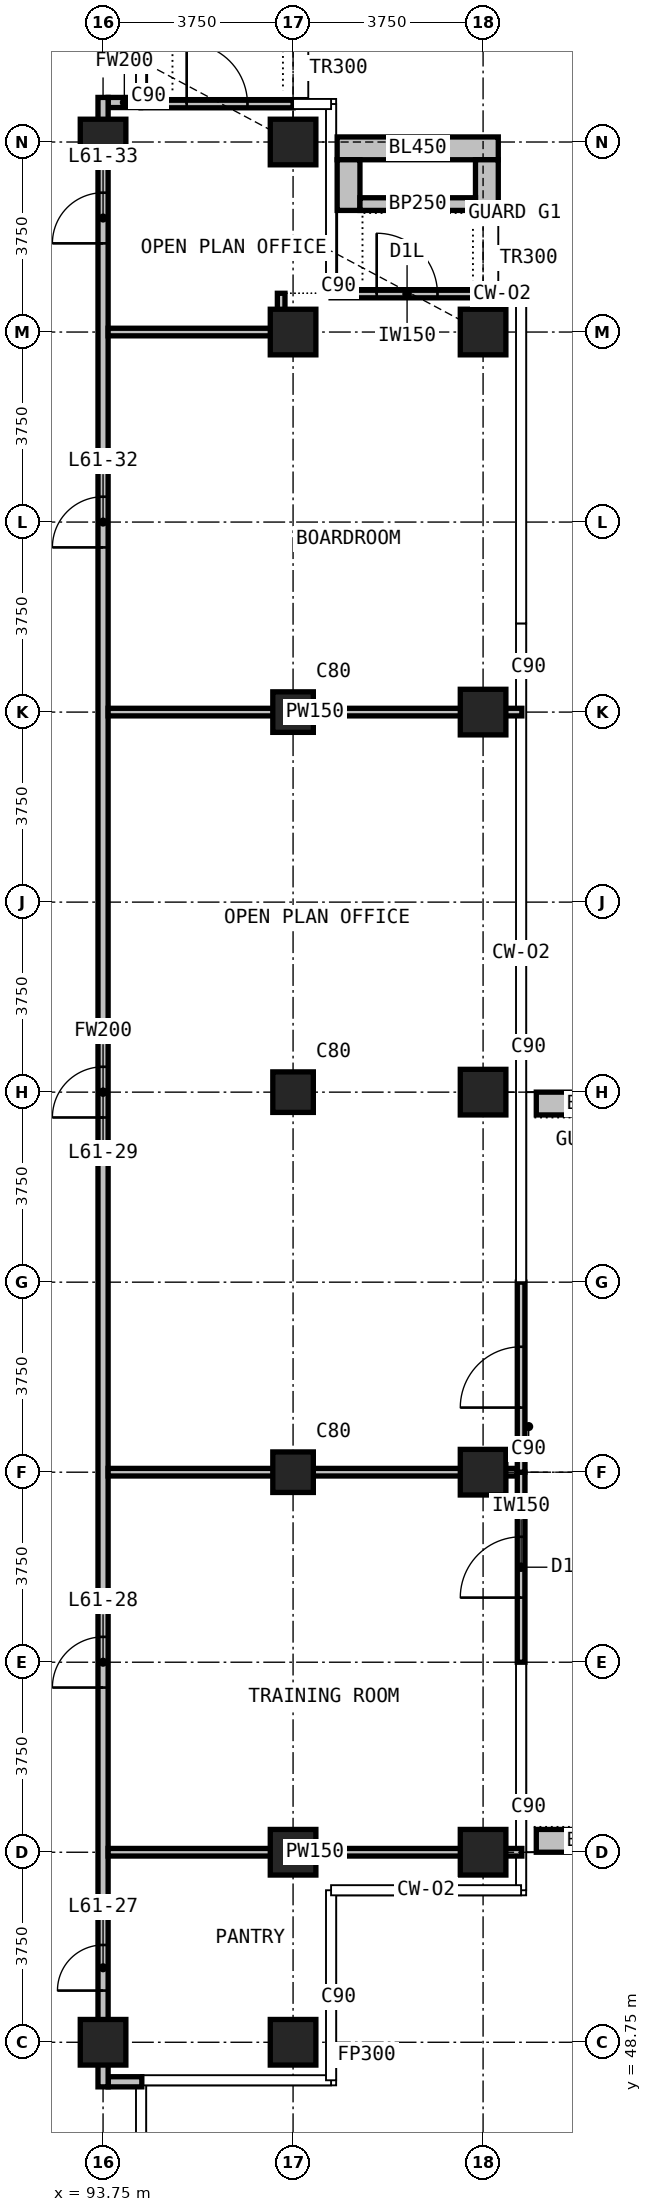
"""IFC4 building model, lengths in metres.
Left out: names, types, materials, properties, quantities, classifications, styles, units other than length and angle.
Written with IfcOpenShell. Run it as: python <this file> out.ifc"""

import sys

from ifc_helpers import new_model, si_unit, direction, frame, frame_2d, origin, origin_2d, place, context, subcontext, project, spatial, rectangle, extrude, element, fill, save


model = new_model("IFC4")
c1 = context("Model", 3, precision=1e-05, world=origin(), true_north=direction((0.0, 1.0)))
c2 = subcontext(c1, "Body", "Model", "MODEL_VIEW")
j1 = project(units=[si_unit("LENGTHUNIT", "METRE"), si_unit("PLANEANGLEUNIT", "RADIAN")], contexts=[c1])
p1 = place(None, origin())
s1 = spatial("IfcSite", under=j1, at=p1, CompositionType="ELEMENT")
p2 = place(p1, origin())
s2 = spatial("IfcBuilding", under=s1, at=p2, CompositionType="ELEMENT")
p3 = place(p2, frame((0.0, 0.0, 235.5)))
s3 = spatial("IfcBuildingStorey", under=s2, at=p3, CompositionType="ELEMENT", Elevation=235.5)
for number, where, z_axis, x_axis in (
    (1, (93.75, 48.75, 0.0), (0.0, 0.0, 1.0), (1.0, 0.0, 0.0)),
    (2, (93.75, 86.25, 0.0), (0.0, 0.0, 1.0), (1.0, 0.0, 0.0)),
    (3, (97.5, 48.75, 0.0), (0.0, 0.0, 1.0), (1.0, 0.0, 0.0)),
    (4, (97.5, 52.5, 0.0), (0.0, 0.0, 1.0), (1.0, 0.0, 0.0)),
):
    element("IfcColumn", number, at=place(p3, frame(where, z_axis=z_axis, x_axis=x_axis)), inside=s3, PredefinedType="COLUMN", context=c2, shape_type="SweptSolid", body=[
        extrude(rectangle(XDim=0.9, YDim=0.9, at=origin_2d()), origin(), (0.0, 0.0, 1.0), 3.6),
    ])
for number, where, z_axis, x_axis in (
    (5, (97.5, 60.0, 0.0), (0.0, 0.0, 1.0), (1.0, 0.0, 0.0)),
    (6, (97.5, 67.5, 0.0), (0.0, 0.0, 1.0), (1.0, 0.0, 0.0)),
    (7, (97.5, 75.0, 0.0), (0.0, 0.0, 1.0), (1.0, 0.0, 0.0)),
):
    element("IfcColumn", number, at=place(p3, frame(where, z_axis=z_axis, x_axis=x_axis)), inside=s3, PredefinedType="COLUMN", context=c2, shape_type="SweptSolid", body=[
        extrude(rectangle(XDim=0.8, YDim=0.8, at=origin_2d()), origin(), (0.0, 0.0, 1.0), 3.6),
    ])
for number, where, z_axis, x_axis in (
    (8, (97.5, 82.5, 0.0), (0.0, 0.0, 1.0), (1.0, 0.0, 0.0)),
    (9, (97.5, 86.25, 0.0), (0.0, 0.0, 1.0), (1.0, 0.0, 0.0)),
    (10, (101.25, 52.5, 0.0), (0.0, 0.0, 1.0), (1.0, 0.0, 0.0)),
    (11, (101.25, 60.0, 0.0), (0.0, 0.0, 1.0), (1.0, 0.0, 0.0)),
    (12, (101.25, 67.5, 0.0), (0.0, 0.0, 1.0), (1.0, 0.0, 0.0)),
    (13, (101.25, 75.0, 0.0), (0.0, 0.0, 1.0), (1.0, 0.0, 0.0)),
    (14, (101.25, 82.5, 0.0), (0.0, 0.0, 1.0), (1.0, 0.0, 0.0)),
):
    element("IfcColumn", number, at=place(p3, frame(where, z_axis=z_axis, x_axis=x_axis)), inside=s3, PredefinedType="COLUMN", context=c2, shape_type="SweptSolid", body=[
        extrude(rectangle(XDim=0.9, YDim=0.9, at=origin_2d()), origin(), (0.0, 0.0, 1.0), 3.6),
    ])
p4 = place(p3, frame((102.0, 56.25, 0.0), z_axis=(0.0, 0.0, 1.0), x_axis=(0.0, 1.0, 0.0)))
e15 = element("IfcWall", 15, at=p4, inside=s3, PredefinedType="SOLIDWALL", context=c2, shape_type="SweptSolid", body=[
    extrude(rectangle(XDim=3.75, YDim=0.15, at=frame_2d((1.875, 0.0))), origin(), (0.0, 0.0, 1.0), 3.3),
])
p5 = place(p4, frame((1.275, 0.0, 0.0)))
e16 = element("IfcOpeningElement", 16, at=p5, cuts=e15, PredefinedType="OPENING", context=c2, shape_type="SweptSolid", body=[
    extrude(rectangle(XDim=1.2, YDim=2.4, at=frame_2d((0.6, 1.2))), frame((0.0, 0.085, 0.0), z_axis=(0.0, -1.0, 0.0), x_axis=(1.0, 0.0, 0.0)), (0.0, 0.0, 1.0), 0.17),
])
p6 = place(p3, frame((102.0, 60.0, 0.0), z_axis=(0.0, 0.0, 1.0), x_axis=(0.0, 1.0, 0.0)))
e17 = element("IfcWall", 17, at=p6, inside=s3, PredefinedType="SOLIDWALL", context=c2, shape_type="SweptSolid", body=[
    extrude(rectangle(XDim=3.75, YDim=0.15, at=frame_2d((1.875, 0.0))), origin(), (0.0, 0.0, 1.0), 3.3),
])
p7 = place(p6, frame((1.275, 0.0, 0.0)))
e18 = element("IfcOpeningElement", 18, at=p7, cuts=e17, PredefinedType="OPENING", context=c2, shape_type="SweptSolid", body=[
    extrude(rectangle(XDim=1.2, YDim=2.4, at=frame_2d((0.6, 1.2))), frame((0.0, 0.085, 0.0), z_axis=(0.0, -1.0, 0.0), x_axis=(1.0, 0.0, 0.0)), (0.0, 0.0, 1.0), 0.17),
])
p8 = place(p3, frame((98.25, 83.25, 0.0), z_axis=(0.0, 0.0, 1.0), x_axis=(1.0, 0.0, 0.0)))
e19 = element("IfcWall", 19, at=p8, inside=s3, PredefinedType="SOLIDWALL", context=c2, shape_type="SweptSolid", body=[
    extrude(rectangle(XDim=3.0, YDim=0.15, at=frame_2d((1.5, 0.0))), origin(), (0.0, 0.0, 1.0), 3.3),
])
p9 = place(p8, frame((0.9, 0.0, 0.0)))
e20 = element("IfcOpeningElement", 20, at=p9, cuts=e19, PredefinedType="OPENING", context=c2, shape_type="SweptSolid", body=[
    extrude(rectangle(XDim=1.2, YDim=2.0, at=frame_2d((0.6, 1.0))), frame((0.0, 0.085, 0.0), z_axis=(0.0, -1.0, 0.0), x_axis=(1.0, 0.0, 0.0)), (0.0, 0.0, 1.0), 0.17),
])
p10 = place(p3, frame((94.5, 87.0, 0.0), z_axis=(0.0, 0.0, 1.0), x_axis=(1.0, 0.0, 0.0)))
e21 = element("IfcWall", 21, at=p10, inside=s3, PredefinedType="SOLIDWALL", context=c2, shape_type="SweptSolid", body=[
    extrude(rectangle(XDim=3.0, YDim=0.15, at=frame_2d((1.5, 0.0))), origin(), (0.0, 0.0, 1.0), 3.3),
])
p11 = place(p10, frame((0.9, 0.0, 0.0)))
e22 = element("IfcOpeningElement", 22, at=p11, cuts=e21, PredefinedType="OPENING", context=c2, shape_type="SweptSolid", body=[
    extrude(rectangle(XDim=1.2, YDim=2.0, at=frame_2d((0.6, 1.0))), frame((0.0, 0.085, 0.0), z_axis=(0.0, -1.0, 0.0), x_axis=(1.0, 0.0, 0.0)), (0.0, 0.0, 1.0), 0.17),
])
for number, where, z_axis, x_axis in (
    (23, (102.3, 52.725, 0.0), (0.0, 0.0, 1.0), (1.0, 0.0, 0.0)),
    (24, (102.3, 67.275, 0.0), (0.0, 0.0, 1.0), (1.0, 0.0, 0.0)),
):
    element("IfcWall", number, at=place(p3, frame(where, z_axis=z_axis, x_axis=x_axis)), inside=s3, PredefinedType="USERDEFINED", context=c2, shape_type="SweptSolid", body=[
        extrude(rectangle(XDim=2.35, YDim=0.45, at=frame_2d((1.175, 0.0))), origin(), (0.0, 0.0, 1.0), 1.1),
    ])
p12 = place(p3, frame((98.37, 86.125, 0.0), z_axis=(0.0, 0.0, 1.0), x_axis=(1.0, 0.0, 0.0)))
e25 = element("IfcWall", 25, at=p12, inside=s3, PredefinedType="USERDEFINED", context=c2, shape_type="SweptSolid", body=[
    extrude(rectangle(XDim=3.18, YDim=0.45, at=frame_2d((1.59, 0.0))), origin(), (0.0, 0.0, 1.0), 1.1),
])
for number, where, z_axis, x_axis in (
    (26, (98.595, 84.9, 0.0), (0.0, 0.0, 1.0), (0.0, 1.0, 0.0)),
    (27, (101.325, 84.9, 0.0), (0.0, 0.0, 1.0), (0.0, 1.0, 0.0)),
):
    element("IfcWall", number, at=place(p3, frame(where, z_axis=z_axis, x_axis=x_axis)), inside=s3, PredefinedType="USERDEFINED", context=c2, shape_type="SweptSolid", body=[
        extrude(rectangle(XDim=1.0, YDim=0.45, at=frame_2d((0.5, 0.0))), origin(), (0.0, 0.0, 1.0), 1.1),
    ])
p13 = place(p3, frame((98.82, 85.025, 0.0), z_axis=(0.0, 0.0, 1.0), x_axis=(1.0, 0.0, 0.0)))
e28 = element("IfcWall", 28, at=p13, inside=s3, PredefinedType="USERDEFINED", context=c2, shape_type="SweptSolid", body=[
    extrude(rectangle(XDim=2.28, YDim=0.25, at=frame_2d((1.14, 0.0))), origin(), (0.0, 0.0, 1.0), 1.0),
])
p14 = place(p3, frame((93.85, 47.97, 0.0), z_axis=(0.0, 0.0, 1.0), x_axis=(1.0, 0.0, 0.0)))
e29 = element("IfcWall", 29, at=p14, inside=s3, PredefinedType="PARTITIONING", context=c2, shape_type="SweptSolid", body=[
    extrude(rectangle(XDim=0.665, YDim=0.2, at=frame_2d((0.333, 0.0))), origin(), (0.0, 0.0, 1.0), 3.3),
])
p15 = place(p3, frame((93.85, 87.03, 0.0), z_axis=(0.0, 0.0, 1.0), x_axis=(1.0, 0.0, 0.0)))
e30 = element("IfcWall", 30, at=p15, inside=s3, PredefinedType="PARTITIONING", context=c2, shape_type="SweptSolid", body=[
    extrude(rectangle(XDim=0.64, YDim=0.2, at=frame_2d((0.32, 0.0))), origin(), (0.0, 0.0, 1.0), 3.3),
])
p16 = place(p3, frame((93.75, 47.87, 0.0), z_axis=(0.0, 0.0, 1.0), x_axis=(0.0, 1.0, 0.0)))
e31 = element("IfcWall", 31, at=p16, inside=s3, PredefinedType="PARTITIONING", context=c2, shape_type="SweptSolid", body=[
    extrude(rectangle(XDim=39.26, YDim=0.2, at=frame_2d((19.63, 0.0))), origin(), (0.0, 0.0, 1.0), 3.3),
])
p17 = place(p16, frame((1.9, 0.0, 0.0)))
e32 = element("IfcOpeningElement", 32, at=p17, cuts=e31, PredefinedType="OPENING", context=c2, shape_type="SweptSolid", body=[
    extrude(rectangle(XDim=0.9, YDim=2.2, at=frame_2d((0.45, 1.1))), frame((0.0, 0.11, 0.0), z_axis=(0.0, -1.0, 0.0), x_axis=(1.0, 0.0, 0.0)), (0.0, 0.0, 1.0), 0.22),
])
p18 = place(p16, frame((7.88, 0.0, 0.0)))
e33 = element("IfcOpeningElement", 33, at=p18, cuts=e31, PredefinedType="OPENING", context=c2, shape_type="SweptSolid", body=[
    extrude(rectangle(XDim=1.0, YDim=2.2, at=frame_2d((0.5, 1.1))), frame((0.0, 0.11, 0.0), z_axis=(0.0, -1.0, 0.0), x_axis=(1.0, 0.0, 0.0)), (0.0, 0.0, 1.0), 0.22),
])
p19 = place(p16, frame((19.13, 0.0, 0.0)))
e34 = element("IfcOpeningElement", 34, at=p19, cuts=e31, PredefinedType="OPENING", context=c2, shape_type="SweptSolid", body=[
    extrude(rectangle(XDim=1.0, YDim=2.2, at=frame_2d((0.5, 1.1))), frame((0.0, 0.11, 0.0), z_axis=(0.0, -1.0, 0.0), x_axis=(1.0, 0.0, 0.0)), (0.0, 0.0, 1.0), 0.22),
])
p20 = place(p16, frame((30.38, 0.0, 0.0)))
e35 = element("IfcOpeningElement", 35, at=p20, cuts=e31, PredefinedType="OPENING", context=c2, shape_type="SweptSolid", body=[
    extrude(rectangle(XDim=1.0, YDim=2.2, at=frame_2d((0.5, 1.1))), frame((0.0, 0.11, 0.0), z_axis=(0.0, -1.0, 0.0), x_axis=(1.0, 0.0, 0.0)), (0.0, 0.0, 1.0), 0.22),
])
p21 = place(p16, frame((36.38, 0.0, 0.0)))
e36 = element("IfcOpeningElement", 36, at=p21, cuts=e31, PredefinedType="OPENING", context=c2, shape_type="SweptSolid", body=[
    extrude(rectangle(XDim=1.0, YDim=2.2, at=frame_2d((0.5, 1.1))), frame((0.0, 0.11, 0.0), z_axis=(0.0, -1.0, 0.0), x_axis=(1.0, 0.0, 0.0)), (0.0, 0.0, 1.0), 0.22),
])
p22 = place(p3, frame((93.85, 52.5, 0.0), z_axis=(0.0, 0.0, 1.0), x_axis=(1.0, 0.0, 0.0)))
e37 = element("IfcWall", 37, at=p22, inside=s3, PredefinedType="PARTITIONING", context=c2, shape_type="SweptSolid", body=[
    extrude(rectangle(XDim=8.165, YDim=0.15, at=frame_2d((4.083, 0.0))), origin(), (0.0, 0.0, 1.0), 3.3),
])
p23 = place(p3, frame((93.85, 60.0, 0.0), z_axis=(0.0, 0.0, 1.0), x_axis=(1.0, 0.0, 0.0)))
e38 = element("IfcWall", 38, at=p23, inside=s3, PredefinedType="PARTITIONING", context=c2, shape_type="SweptSolid", body=[
    extrude(rectangle(XDim=8.065, YDim=0.15, at=frame_2d((4.032, 0.0))), origin(), (0.0, 0.0, 1.0), 3.3),
])
p24 = place(p3, frame((93.85, 75.0, 0.0), z_axis=(0.0, 0.0, 1.0), x_axis=(1.0, 0.0, 0.0)))
e39 = element("IfcWall", 39, at=p24, inside=s3, PredefinedType="PARTITIONING", context=c2, shape_type="SweptSolid", body=[
    extrude(rectangle(XDim=8.165, YDim=0.15, at=frame_2d((4.083, 0.0))), origin(), (0.0, 0.0, 1.0), 3.3),
])
p25 = place(p3, frame((93.85, 82.5, 0.0), z_axis=(0.0, 0.0, 1.0), x_axis=(1.0, 0.0, 0.0)))
e40 = element("IfcWall", 40, at=p25, inside=s3, PredefinedType="PARTITIONING", context=c2, shape_type="SweptSolid", body=[
    extrude(rectangle(XDim=3.34, YDim=0.15, at=frame_2d((1.67, 0.0))), origin(), (0.0, 0.0, 1.0), 3.3),
])
p26 = place(p3, frame((97.265, 82.425, 0.0), z_axis=(0.0, 0.0, 1.0), x_axis=(0.0, 1.0, 0.0)))
e41 = element("IfcWall", 41, at=p26, inside=s3, PredefinedType="PARTITIONING", context=c2, shape_type="SweptSolid", body=[
    extrude(rectangle(XDim=0.84, YDim=0.15, at=frame_2d((0.42, 0.0))), origin(), (0.0, 0.0, 1.0), 3.3),
])
p27 = place(p5, origin())
e42 = element("IfcDoor", 42, at=p27, inside=s3, OperationType="SINGLE_SWING_LEFT", PredefinedType="DOOR", context=c2, shape_type="SweptSolid", body=[
    extrude(rectangle(XDim=1.2, YDim=2.4, at=frame_2d((0.6, 1.2))), frame((0.0, 0.025, 0.0), z_axis=(0.0, -1.0, 0.0), x_axis=(1.0, 0.0, 0.0)), (0.0, 0.0, 1.0), 0.05),
])
fill(e16, e42)
p28 = place(p7, origin())
e43 = element("IfcDoor", 43, at=p28, inside=s3, OperationType="SINGLE_SWING_LEFT", PredefinedType="DOOR", context=c2, shape_type="SweptSolid", body=[
    extrude(rectangle(XDim=1.2, YDim=2.4, at=frame_2d((0.6, 1.2))), frame((0.0, 0.025, 0.0), z_axis=(0.0, -1.0, 0.0), x_axis=(1.0, 0.0, 0.0)), (0.0, 0.0, 1.0), 0.05),
])
fill(e18, e43)
p29 = place(p9, origin())
e44 = element("IfcDoor", 44, at=p29, inside=s3, OperationType="SINGLE_SWING_LEFT", PredefinedType="DOOR", context=c2, shape_type="SweptSolid", body=[
    extrude(rectangle(XDim=1.2, YDim=2.0, at=frame_2d((0.6, 1.0))), frame((0.0, 0.025, 0.0), z_axis=(0.0, -1.0, 0.0), x_axis=(1.0, 0.0, 0.0)), (0.0, 0.0, 1.0), 0.05),
])
fill(e20, e44)
p30 = place(p11, origin())
e45 = element("IfcDoor", 45, at=p30, inside=s3, OperationType="SINGLE_SWING_LEFT", PredefinedType="DOOR", context=c2, shape_type="SweptSolid", body=[
    extrude(rectangle(XDim=1.2, YDim=2.0, at=frame_2d((0.6, 1.0))), frame((0.0, 0.025, 0.0), z_axis=(0.0, -1.0, 0.0), x_axis=(1.0, 0.0, 0.0)), (0.0, 0.0, 1.0), 0.05),
])
fill(e22, e45)
p31 = place(p17, origin())
e46 = element("IfcDoor", 46, at=p31, inside=s3, OperationType="SINGLE_SWING_LEFT", PredefinedType="DOOR", context=c2, shape_type="SweptSolid", body=[
    extrude(rectangle(XDim=0.9, YDim=2.2, at=frame_2d((0.45, 1.1))), frame((0.0, 0.025, 0.0), z_axis=(0.0, -1.0, 0.0), x_axis=(1.0, 0.0, 0.0)), (0.0, 0.0, 1.0), 0.05),
])
fill(e32, e46)
p32 = place(p18, origin())
e47 = element("IfcDoor", 47, at=p32, inside=s3, OperationType="SINGLE_SWING_LEFT", PredefinedType="DOOR", context=c2, shape_type="SweptSolid", body=[
    extrude(rectangle(XDim=1.0, YDim=2.2, at=frame_2d((0.5, 1.1))), frame((0.0, 0.025, 0.0), z_axis=(0.0, -1.0, 0.0), x_axis=(1.0, 0.0, 0.0)), (0.0, 0.0, 1.0), 0.05),
])
fill(e33, e47)
p33 = place(p19, origin())
e48 = element("IfcDoor", 48, at=p33, inside=s3, OperationType="SINGLE_SWING_LEFT", PredefinedType="DOOR", context=c2, shape_type="SweptSolid", body=[
    extrude(rectangle(XDim=1.0, YDim=2.2, at=frame_2d((0.5, 1.1))), frame((0.0, 0.025, 0.0), z_axis=(0.0, -1.0, 0.0), x_axis=(1.0, 0.0, 0.0)), (0.0, 0.0, 1.0), 0.05),
])
fill(e34, e48)
p34 = place(p20, origin())
e49 = element("IfcDoor", 49, at=p34, inside=s3, OperationType="SINGLE_SWING_RIGHT", PredefinedType="DOOR", context=c2, shape_type="SweptSolid", body=[
    extrude(rectangle(XDim=1.0, YDim=2.2, at=frame_2d((0.5, 1.1))), frame((0.0, 0.025, 0.0), z_axis=(0.0, -1.0, 0.0), x_axis=(1.0, 0.0, 0.0)), (0.0, 0.0, 1.0), 0.05),
])
fill(e35, e49)
p35 = place(p21, origin())
e50 = element("IfcDoor", 50, at=p35, inside=s3, OperationType="SINGLE_SWING_LEFT", PredefinedType="DOOR", context=c2, shape_type="SweptSolid", body=[
    extrude(rectangle(XDim=1.0, YDim=2.2, at=frame_2d((0.5, 1.1))), frame((0.0, 0.025, 0.0), z_axis=(0.0, -1.0, 0.0), x_axis=(1.0, 0.0, 0.0)), (0.0, 0.0, 1.0), 0.05),
])
fill(e36, e50)
save(model, sys.argv[1])
